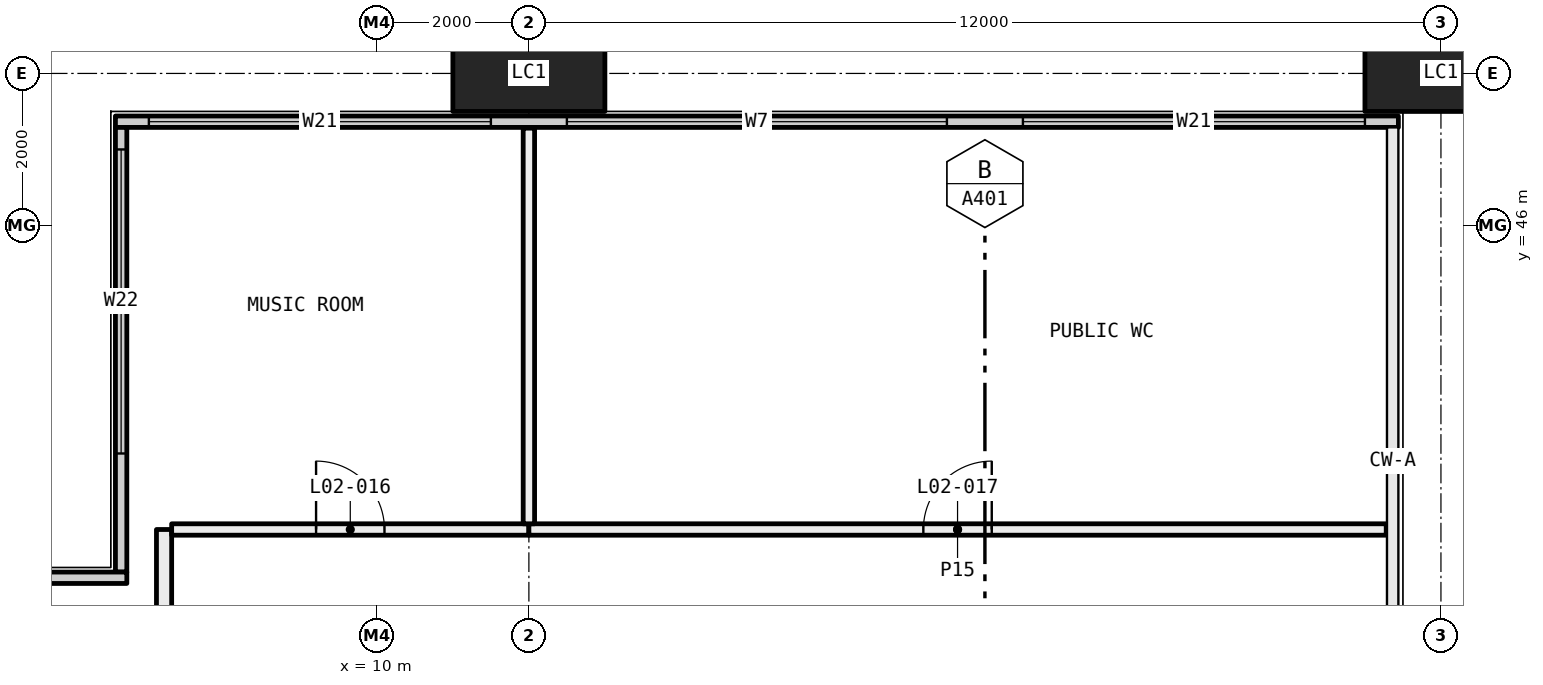
"""IFC4 building model, lengths in metres.
Left out: names, types, materials, properties, quantities, classifications, styles, units other than length and angle.
Written with IfcOpenShell. Run it as: python <this file> out.ifc"""

import sys

from ifc_helpers import new_model, si_unit, direction, frame, frame_2d, origin, origin_2d, place, context, subcontext, project, spatial, rectangle, hollow_rectangle, extrude, element, fill, save


model = new_model("IFC4")
c1 = context("Model", 3, precision=1e-05, world=origin(), true_north=direction((0.0, 1.0)))
c2 = subcontext(c1, "Body", "Model", "MODEL_VIEW")
j1 = project(units=[si_unit("LENGTHUNIT", "METRE"), si_unit("PLANEANGLEUNIT", "RADIAN")], contexts=[c1])
p1 = place(None, origin())
s1 = spatial("IfcSite", under=j1, at=p1, CompositionType="ELEMENT")
p2 = place(p1, origin())
s2 = spatial("IfcBuilding", under=s1, at=p2, CompositionType="ELEMENT")
p3 = place(p2, frame((0.0, 0.0, 12.0)))
s3 = spatial("IfcBuildingStorey", under=s2, at=p3, CompositionType="ELEMENT", Elevation=12.0)
for number, where, z_axis, x_axis in (
    (1, (12.0, 48.0, -0.4), (0.0, 0.0, 1.0), (1.0, 0.0, 0.0)),
    (2, (24.0, 48.0, -0.4), (0.0, 0.0, 1.0), (1.0, 0.0, 0.0)),
):
    element("IfcColumn", number, at=place(p3, frame(where, z_axis=z_axis, x_axis=x_axis)), inside=s3, PredefinedType="COLUMN", context=c2, shape_type="SweptSolid", body=[
        extrude(hollow_rectangle(XDim=2.0, YDim=1.0, WallThickness=0.08, at=origin_2d()), origin(), (0.0, 0.0, 1.0), 6.0),
    ])
p4 = place(p3, frame((6.56, 47.365, 0.0), z_axis=(0.0, 0.0, 1.0), x_axis=(1.0, 0.0, 0.0)))
e3 = element("IfcWall", 3, at=p4, inside=s3, PredefinedType="ELEMENTEDWALL", context=c2, shape_type="SweptSolid", body=[
    extrude(rectangle(XDim=16.88, YDim=0.15, at=frame_2d((8.44, 0.0))), origin(), (0.0, 0.0, 1.0), 5.6),
])
p5 = place(p4, frame((0.44, 0.0, 0.45)))
e4 = element("IfcOpeningElement", 4, at=p5, cuts=e3, PredefinedType="OPENING", context=c2, shape_type="SweptSolid", body=[
    extrude(rectangle(XDim=4.5, YDim=5.1, at=frame_2d((2.25, 2.55))), frame((0.0, 0.085, 0.0), z_axis=(0.0, -1.0, 0.0), x_axis=(1.0, 0.0, 0.0)), (0.0, 0.0, 1.0), 0.17),
])
p6 = place(p4, frame((5.94, 0.0, 0.45)))
e5 = element("IfcOpeningElement", 5, at=p6, cuts=e3, PredefinedType="OPENING", context=c2, shape_type="SweptSolid", body=[
    extrude(rectangle(XDim=5.0, YDim=5.1, at=frame_2d((2.5, 2.55))), frame((0.0, 0.085, 0.0), z_axis=(0.0, -1.0, 0.0), x_axis=(1.0, 0.0, 0.0)), (0.0, 0.0, 1.0), 0.17),
])
p7 = place(p4, frame((11.94, 0.0, 0.45)))
e6 = element("IfcOpeningElement", 6, at=p7, cuts=e3, PredefinedType="OPENING", context=c2, shape_type="SweptSolid", body=[
    extrude(rectangle(XDim=4.5, YDim=5.1, at=frame_2d((2.25, 2.55))), frame((0.0, 0.085, 0.0), z_axis=(0.0, -1.0, 0.0), x_axis=(1.0, 0.0, 0.0)), (0.0, 0.0, 1.0), 0.17),
])
p8 = place(p3, frame((6.635, 41.44, 0.0), z_axis=(0.0, 0.0, 1.0), x_axis=(0.0, 1.0, 0.0)))
e7 = element("IfcWall", 7, at=p8, inside=s3, PredefinedType="ELEMENTEDWALL", context=c2, shape_type="SweptSolid", body=[
    extrude(rectangle(XDim=5.85, YDim=0.15, at=frame_2d((2.925, 0.0))), origin(), (0.0, 0.0, 1.0), 5.6),
])
p9 = place(p8, frame((1.56, 0.0, 0.45)))
e8 = element("IfcOpeningElement", 8, at=p9, cuts=e7, PredefinedType="OPENING", context=c2, shape_type="SweptSolid", body=[
    extrude(rectangle(XDim=4.0, YDim=5.1, at=frame_2d((2.0, 2.55))), frame((0.0, 0.085, 0.0), z_axis=(0.0, -1.0, 0.0), x_axis=(1.0, 0.0, 0.0)), (0.0, 0.0, 1.0), 0.17),
])
p10 = place(p3, frame((0.56, 41.365, 0.0), z_axis=(0.0, 0.0, 1.0), x_axis=(1.0, 0.0, 0.0)))
e9 = element("IfcWall", 9, at=p10, inside=s3, PredefinedType="ELEMENTEDWALL", context=c2, shape_type="SweptSolid", body=[
    extrude(rectangle(XDim=6.15, YDim=0.15, at=frame_2d((3.075, 0.0))), origin(), (0.0, 0.0, 1.0), 5.6),
])
p11 = place(p10, frame((0.44, 0.0, 0.45)))
e10 = element("IfcOpeningElement", 10, at=p11, cuts=e9, PredefinedType="OPENING", context=c2, shape_type="SweptSolid", body=[
    extrude(rectangle(XDim=4.0, YDim=5.1, at=frame_2d((2.0, 2.55))), frame((0.0, 0.085, 0.0), z_axis=(0.0, -1.0, 0.0), x_axis=(1.0, 0.0, 0.0)), (0.0, 0.0, 1.0), 0.17),
])
p12 = place(p3, frame((7.2, 42.0, 0.0), z_axis=(0.0, 0.0, 1.0), x_axis=(0.0, -1.0, 0.0)))
e11 = element("IfcWall", 11, at=p12, inside=s3, PredefinedType="PARTITIONING", context=c2, shape_type="SweptSolid", body=[
    extrude(rectangle(XDim=6.0, YDim=0.2, at=frame_2d((3.0, 0.0))), origin(), (0.0, 0.0, 1.0), 5.0),
])
p13 = place(p12, frame((2.55, 0.0, 0.0)))
e12 = element("IfcOpeningElement", 12, at=p13, cuts=e11, PredefinedType="OPENING", context=c2, shape_type="SweptSolid", body=[
    extrude(rectangle(XDim=0.9, YDim=2.1, at=frame_2d((0.45, 1.05))), frame((0.0, 0.11, 0.0), z_axis=(0.0, -1.0, 0.0), x_axis=(1.0, 0.0, 0.0)), (0.0, 0.0, 1.0), 0.22),
])
p14 = place(p3, frame((12.0, 42.0, 0.0), z_axis=(0.0, 0.0, 1.0), x_axis=(-1.0, 0.0, 0.0)))
e13 = element("IfcWall", 13, at=p14, inside=s3, PredefinedType="PARTITIONING", context=c2, shape_type="SweptSolid", body=[
    extrude(rectangle(XDim=4.7, YDim=0.15, at=frame_2d((2.35, 0.0))), origin(), (0.0, 0.0, 1.0), 5.6),
])
p15 = place(p14, frame((1.9, 0.0, 0.0)))
e14 = element("IfcOpeningElement", 14, at=p15, cuts=e13, PredefinedType="OPENING", context=c2, shape_type="SweptSolid", body=[
    extrude(rectangle(XDim=0.9, YDim=2.1, at=frame_2d((0.45, 1.05))), frame((0.0, 0.085, 0.0), z_axis=(0.0, -1.0, 0.0), x_axis=(1.0, 0.0, 0.0)), (0.0, 0.0, 1.0), 0.17),
])
p16 = place(p3, frame((23.28, 42.0, 0.0), z_axis=(0.0, 0.0, 1.0), x_axis=(-1.0, 0.0, 0.0)))
e15 = element("IfcWall", 15, at=p16, inside=s3, PredefinedType="PARTITIONING", context=c2, shape_type="SweptSolid", body=[
    extrude(rectangle(XDim=11.28, YDim=0.15, at=frame_2d((5.64, 0.0))), origin(), (0.0, 0.0, 1.0), 5.6),
])
p17 = place(p16, frame((5.19, 0.0, 0.0)))
e16 = element("IfcOpeningElement", 16, at=p17, cuts=e15, PredefinedType="OPENING", context=c2, shape_type="SweptSolid", body=[
    extrude(rectangle(XDim=0.9, YDim=2.1, at=frame_2d((0.45, 1.05))), frame((0.0, 0.085, 0.0), z_axis=(0.0, -1.0, 0.0), x_axis=(1.0, 0.0, 0.0)), (0.0, 0.0, 1.0), 0.17),
])
p18 = place(p3, frame((12.0, 42.075, 0.0), z_axis=(0.0, 0.0, 1.0), x_axis=(0.0, 1.0, 0.0)))
e17 = element("IfcWall", 17, at=p18, inside=s3, PredefinedType="PARTITIONING", context=c2, shape_type="SweptSolid", body=[
    extrude(rectangle(XDim=5.205, YDim=0.15, at=frame_2d((2.603, 0.0))), origin(), (0.0, 0.0, 1.0), 5.6),
])
p19 = place(p5, origin())
e18 = element("IfcWindow", 18, at=p19, inside=s3, PartitioningType="SINGLE_PANEL", PredefinedType="WINDOW", context=c2, shape_type="SweptSolid", body=[
    extrude(rectangle(XDim=4.5, YDim=5.1, at=frame_2d((2.25, 2.55))), frame((0.0, 0.03, 0.0), z_axis=(0.0, -1.0, 0.0), x_axis=(1.0, 0.0, 0.0)), (0.0, 0.0, 1.0), 0.06),
])
fill(e4, e18)
p20 = place(p6, origin())
e19 = element("IfcWindow", 19, at=p20, inside=s3, PartitioningType="SINGLE_PANEL", PredefinedType="WINDOW", context=c2, shape_type="SweptSolid", body=[
    extrude(rectangle(XDim=5.0, YDim=5.1, at=frame_2d((2.5, 2.55))), frame((0.0, 0.03, 0.0), z_axis=(0.0, -1.0, 0.0), x_axis=(1.0, 0.0, 0.0)), (0.0, 0.0, 1.0), 0.06),
])
fill(e5, e19)
p21 = place(p7, origin())
e20 = element("IfcWindow", 20, at=p21, inside=s3, PartitioningType="SINGLE_PANEL", PredefinedType="WINDOW", context=c2, shape_type="SweptSolid", body=[
    extrude(rectangle(XDim=4.5, YDim=5.1, at=frame_2d((2.25, 2.55))), frame((0.0, 0.03, 0.0), z_axis=(0.0, -1.0, 0.0), x_axis=(1.0, 0.0, 0.0)), (0.0, 0.0, 1.0), 0.06),
])
fill(e6, e20)
p22 = place(p9, origin())
e21 = element("IfcWindow", 21, at=p22, inside=s3, PartitioningType="SINGLE_PANEL", PredefinedType="WINDOW", context=c2, shape_type="SweptSolid", body=[
    extrude(rectangle(XDim=4.0, YDim=5.1, at=frame_2d((2.0, 2.55))), frame((0.0, 0.03, 0.0), z_axis=(0.0, -1.0, 0.0), x_axis=(1.0, 0.0, 0.0)), (0.0, 0.0, 1.0), 0.06),
])
fill(e8, e21)
p23 = place(p15, frame((0.9, 0.0, 0.0), x_axis=(-1.0, 0.0, 0.0)))
e22 = element("IfcDoor", 22, at=p23, inside=s3, OperationType="SINGLE_SWING_RIGHT", PredefinedType="DOOR", context=c2, shape_type="SweptSolid", body=[
    extrude(rectangle(XDim=0.9, YDim=2.1, at=frame_2d((0.45, 1.05))), frame((0.0, 0.025, 0.0), z_axis=(0.0, -1.0, 0.0), x_axis=(1.0, 0.0, 0.0)), (0.0, 0.0, 1.0), 0.05),
])
fill(e14, e22)
p24 = place(p17, frame((0.9, 0.0, 0.0), x_axis=(-1.0, 0.0, 0.0)))
e23 = element("IfcDoor", 23, at=p24, inside=s3, OperationType="SINGLE_SWING_LEFT", PredefinedType="DOOR", context=c2, shape_type="SweptSolid", body=[
    extrude(rectangle(XDim=0.9, YDim=2.1, at=frame_2d((0.45, 1.05))), frame((0.0, 0.025, 0.0), z_axis=(0.0, -1.0, 0.0), x_axis=(1.0, 0.0, 0.0)), (0.0, 0.0, 1.0), 0.05),
])
fill(e16, e23)
save(model, sys.argv[1])
